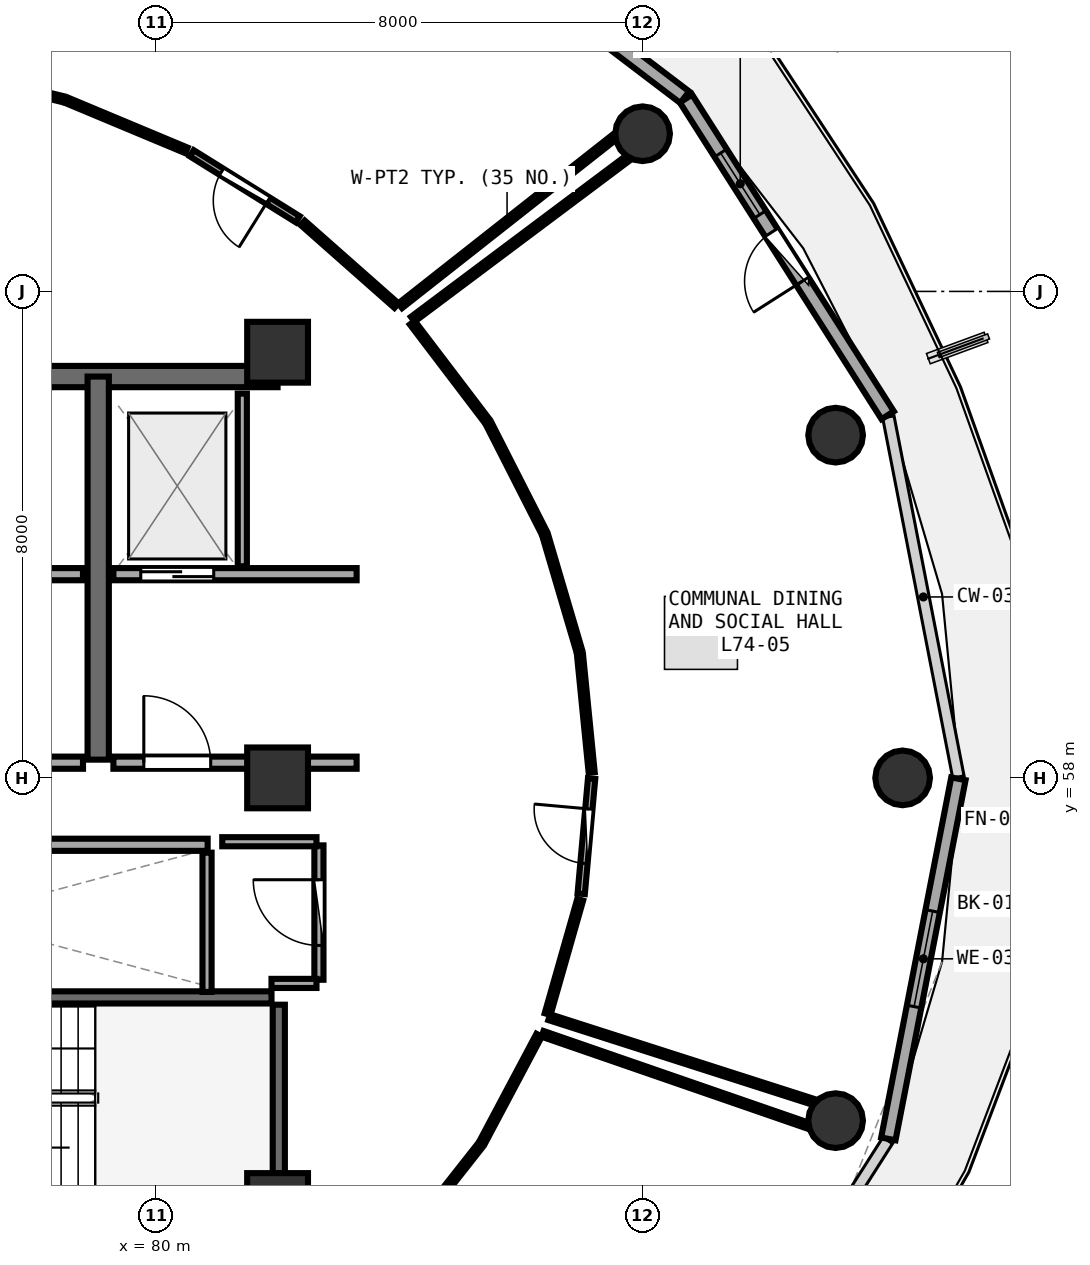
"""IFC4 building model, lengths in metres.
Left out: names, types, materials, properties, quantities, classifications, styles, units other than length and angle.
Written with IfcOpenShell. Run it as: python <this file> out.ifc"""

import sys

from ifc_helpers import new_model, si_unit, direction, frame, frame_2d, origin, origin_2d, place, context, subcontext, project, spatial, rectangle, circle, extrude, element, fill, save


model = new_model("IFC4")
c1 = context("Model", 3, precision=1e-05, world=origin(), true_north=direction((0.0, 1.0)))
c2 = subcontext(c1, "Body", "Model", "MODEL_VIEW")
j1 = project(units=[si_unit("LENGTHUNIT", "METRE"), si_unit("PLANEANGLEUNIT", "RADIAN")], contexts=[c1])
p1 = place(None, origin())
s1 = spatial("IfcSite", under=j1, at=p1, CompositionType="ELEMENT")
p2 = place(p1, origin())
s2 = spatial("IfcBuilding", under=s1, at=p2, CompositionType="ELEMENT")
p3 = place(p2, frame((0.0, 0.0, 289.95)))
s3 = spatial("IfcBuildingStorey", under=s2, at=p3, CompositionType="ELEMENT", Elevation=289.95)
for number, where, z_axis, x_axis in (
    (1, (82.0, 51.0, 0.0), (0.0, 0.0, 1.0), (1.0, 0.0, 0.0)),
    (2, (82.0, 58.0, 0.0), (0.0, 0.0, 1.0), (1.0, 0.0, 0.0)),
    (3, (82.0, 65.0, 0.0), (0.0, 0.0, 1.0), (1.0, 0.0, 0.0)),
):
    element("IfcColumn", number, at=place(p3, frame(where, z_axis=z_axis, x_axis=x_axis)), inside=s3, PredefinedType="PILASTER", context=c2, shape_type="SweptSolid", body=[
        extrude(rectangle(XDim=1.0, YDim=1.0, at=origin_2d()), origin(), (0.0, 0.0, 1.0), 3.75),
    ])
for number, where, z_axis, x_axis in (
    (4, (92.28, 58.0, 0.0), (0.0, 0.0, 1.0), (1.0, 0.0, 0.0)),
    (5, (91.177, 63.636, 0.0), (0.0, 0.0, 1.0), (1.0, 0.0, 0.0)),
    (6, (88.003, 68.593, 0.0), (0.0, 0.0, 1.0), (1.0, 0.0, 0.0)),
    (7, (91.177, 52.364, 0.0), (0.0, 0.0, 1.0), (1.0, 0.0, 0.0)),
):
    element("IfcColumn", number, at=place(p3, frame(where, z_axis=z_axis, x_axis=x_axis)), inside=s3, PredefinedType="COLUMN", context=c2, shape_type="SweptSolid", body=[
        extrude(circle(Radius=0.45, at=origin_2d()), origin(), (0.0, 0.0, 1.0), 3.75),
    ])
p4 = place(p3, frame((92.034, 63.964, 0.0), z_axis=(0.0, 0.0, 1.0), x_axis=(-0.537271968456, 0.843409053728, 0.0)))
e8 = element("IfcWall", 8, at=p4, inside=s3, PredefinedType="SOLIDWALL", context=c2, shape_type="SweptSolid", body=[
    extrude(rectangle(XDim=6.175, YDim=0.24, at=frame_2d((3.087, 0.0))), origin(), (0.0, 0.0, 1.0), 3.415),
])
p5 = place(p4, frame((2.613, 0.0, 0.0)))
e9 = element("IfcOpeningElement", 9, at=p5, cuts=e8, PredefinedType="OPENING", context=c2, shape_type="SweptSolid", body=[
    extrude(rectangle(XDim=0.95, YDim=2.1, at=frame_2d((0.475, 1.05))), frame((0.0, 0.13, 0.0), z_axis=(0.0, -1.0, 0.0), x_axis=(1.0, 0.0, 0.0)), (0.0, 0.0, 1.0), 0.26),
])
p6 = place(p4, frame((3.913, 0.0, 0.85)))
e10 = element("IfcOpeningElement", 10, at=p6, cuts=e8, PredefinedType="OPENING", context=c2, shape_type="SweptSolid", body=[
    extrude(rectangle(XDim=1.2, YDim=1.45, at=frame_2d((0.6, 0.725))), frame((0.0, 0.13, 0.0), z_axis=(0.0, -1.0, 0.0), x_axis=(1.0, 0.0, 0.0)), (0.0, 0.0, 1.0), 0.26),
])
p7 = place(p3, frame((88.696, 69.194, 0.0), z_axis=(0.0, 0.0, 1.0), x_axis=(-0.796010444211, 0.605282886514, 0.0)))
e11 = element("IfcWall", 11, at=p7, inside=s3, PredefinedType="SOLIDWALL", context=c2, shape_type="SweptSolid", body=[
    extrude(rectangle(XDim=6.387, YDim=0.24, at=frame_2d((3.194, 0.0))), origin(), (0.0, 0.0, 1.0), 3.415),
])
p8 = place(p7, frame((2.719, 0.0, 0.0)))
e12 = element("IfcOpeningElement", 12, at=p8, cuts=e11, PredefinedType="OPENING", context=c2, shape_type="SweptSolid", body=[
    extrude(rectangle(XDim=0.95, YDim=2.1, at=frame_2d((0.475, 1.05))), frame((0.0, 0.13, 0.0), z_axis=(0.0, -1.0, 0.0), x_axis=(1.0, 0.0, 0.0)), (0.0, 0.0, 1.0), 0.26),
])
p9 = place(p7, frame((4.019, 0.0, 0.85)))
e13 = element("IfcOpeningElement", 13, at=p9, cuts=e11, PredefinedType="OPENING", context=c2, shape_type="SweptSolid", body=[
    extrude(rectangle(XDim=1.2, YDim=1.45, at=frame_2d((0.6, 0.725))), frame((0.0, 0.13, 0.0), z_axis=(0.0, -1.0, 0.0), x_axis=(1.0, 0.0, 0.0)), (0.0, 0.0, 1.0), 0.26),
])
p10 = place(p3, frame((92.045, 52.063, 0.0), z_axis=(0.0, 0.0, 1.0), x_axis=(0.190969309115, 0.981596008028, 0.0)))
e14 = element("IfcWall", 14, at=p10, inside=s3, PredefinedType="SOLIDWALL", context=c2, shape_type="SweptSolid", body=[
    extrude(rectangle(XDim=6.033, YDim=0.24, at=frame_2d((3.017, 0.0))), origin(), (0.0, 0.0, 1.0), 3.415),
])
p11 = place(p10, frame((2.216, 0.0, 0.85)))
e15 = element("IfcOpeningElement", 15, at=p11, cuts=e14, PredefinedType="OPENING", context=c2, shape_type="SweptSolid", body=[
    extrude(rectangle(XDim=1.6, YDim=1.45, at=frame_2d((0.8, 0.725))), frame((0.0, 0.13, 0.0), z_axis=(0.0, -1.0, 0.0), x_axis=(1.0, 0.0, 0.0)), (0.0, 0.0, 1.0), 0.26),
])
p12 = place(p3, frame((82.02, 51.2, 0.0), z_axis=(0.0, 0.0, 1.0), x_axis=(0.0, 1.0, 0.0)))
e16 = element("IfcWall", 16, at=p12, inside=s3, PredefinedType="SHEAR", context=c2, shape_type="SweptSolid", body=[
    extrude(rectangle(XDim=3.07, YDim=0.2, at=frame_2d((1.535, 0.0))), origin(), (0.0, 0.0, 1.0), 3.43),
])
p13 = place(p3, frame((81.9, 54.39, 0.0), z_axis=(0.0, 0.0, 1.0), x_axis=(-1.0, 0.0, 0.0)))
e17 = element("IfcWall", 17, at=p13, inside=s3, PredefinedType="SHEAR", context=c2, shape_type="SweptSolid", body=[
    extrude(rectangle(XDim=8.46, YDim=0.2, at=frame_2d((4.23, 0.0))), origin(), (0.0, 0.0, 1.0), 3.43),
])
p14 = place(p3, frame((74.0, 64.6, 0.0), z_axis=(0.0, 0.0, 1.0), x_axis=(1.0, 0.0, 0.0)))
e18 = element("IfcWall", 18, at=p14, inside=s3, PredefinedType="SHEAR", context=c2, shape_type="SweptSolid", body=[
    extrude(rectangle(XDim=8.0, YDim=0.35, at=frame_2d((4.0, 0.0))), origin(), (0.0, 0.0, 1.0), 3.43),
])
p15 = place(p3, frame((79.05, 58.3, 0.0), z_axis=(0.0, 0.0, 1.0), x_axis=(0.0, 1.0, 0.0)))
e19 = element("IfcWall", 19, at=p15, inside=s3, PredefinedType="SHEAR", context=c2, shape_type="SweptSolid", body=[
    extrude(rectangle(XDim=6.3, YDim=0.35, at=frame_2d((3.15, 0.0))), origin(), (0.0, 0.0, 1.0), 3.43),
])
p16 = place(p3, frame((74.2, 61.35, 0.0), z_axis=(0.0, 0.0, 1.0), x_axis=(1.0, 0.0, 0.0)))
e20 = element("IfcWall", 20, at=p16, inside=s3, PredefinedType="SOLIDWALL", context=c2, shape_type="SweptSolid", body=[
    extrude(rectangle(XDim=4.6, YDim=0.2, at=frame_2d((2.3, 0.0))), origin(), (0.0, 0.0, 1.0), 3.42),
])
p17 = place(p16, frame((0.52, 0.0, 0.0)))
e21 = element("IfcOpeningElement", 21, at=p17, cuts=e20, PredefinedType="OPENING", context=c2, shape_type="SweptSolid", body=[
    extrude(rectangle(XDim=1.2, YDim=2.15, at=frame_2d((0.6, 1.075))), frame((0.0, 0.11, 0.0), z_axis=(0.0, -1.0, 0.0), x_axis=(1.0, 0.0, 0.0)), (0.0, 0.0, 1.0), 0.22),
])
p18 = place(p3, frame((79.3, 61.35, 0.0), z_axis=(0.0, 0.0, 1.0), x_axis=(1.0, 0.0, 0.0)))
e22 = element("IfcWall", 22, at=p18, inside=s3, PredefinedType="SOLIDWALL", context=c2, shape_type="SweptSolid", body=[
    extrude(rectangle(XDim=4.0, YDim=0.2, at=frame_2d((2.0, 0.0))), origin(), (0.0, 0.0, 1.0), 2.715),
])
p19 = place(p18, frame((0.45, 0.0, 0.0)))
e23 = element("IfcOpeningElement", 23, at=p19, cuts=e22, PredefinedType="OPENING", context=c2, shape_type="SweptSolid", body=[
    extrude(rectangle(XDim=1.2, YDim=2.15, at=frame_2d((0.6, 1.075))), frame((0.0, 0.11, 0.0), z_axis=(0.0, -1.0, 0.0), x_axis=(1.0, 0.0, 0.0)), (0.0, 0.0, 1.0), 0.22),
])
p20 = place(p3, frame((81.42, 61.48, 0.0), z_axis=(0.0, 0.0, 1.0), x_axis=(0.0, 1.0, 0.0)))
e24 = element("IfcWall", 24, at=p20, inside=s3, PredefinedType="PARTITIONING", context=c2, shape_type="SweptSolid", body=[
    extrude(rectangle(XDim=2.84, YDim=0.15, at=frame_2d((1.42, 0.0))), origin(), (0.0, 0.0, 1.0), 3.42),
])
p21 = place(p3, frame((74.2, 58.25, 0.0), z_axis=(0.0, 0.0, 1.0), x_axis=(1.0, 0.0, 0.0)))
e25 = element("IfcWall", 25, at=p21, inside=s3, PredefinedType="SOLIDWALL", context=c2, shape_type="SweptSolid", body=[
    extrude(rectangle(XDim=4.6, YDim=0.2, at=frame_2d((2.3, 0.0))), origin(), (0.0, 0.0, 1.0), 3.42),
])
p22 = place(p21, frame((1.8, 0.0, 0.0)))
e26 = element("IfcOpeningElement", 26, at=p22, cuts=e25, PredefinedType="OPENING", context=c2, shape_type="SweptSolid", body=[
    extrude(rectangle(XDim=1.1, YDim=2.1, at=frame_2d((0.55, 1.05))), frame((0.0, 0.11, 0.0), z_axis=(0.0, -1.0, 0.0), x_axis=(1.0, 0.0, 0.0)), (0.0, 0.0, 1.0), 0.22),
])
p23 = place(p3, frame((79.3, 58.25, 0.0), z_axis=(0.0, 0.0, 1.0), x_axis=(1.0, 0.0, 0.0)))
e27 = element("IfcWall", 27, at=p23, inside=s3, PredefinedType="SOLIDWALL", context=c2, shape_type="SweptSolid", body=[
    extrude(rectangle(XDim=4.0, YDim=0.2, at=frame_2d((2.0, 0.0))), origin(), (0.0, 0.0, 1.0), 2.715),
])
p24 = place(p23, frame((0.5, 0.0, 0.0)))
e28 = element("IfcOpeningElement", 28, at=p24, cuts=e27, PredefinedType="OPENING", context=c2, shape_type="SweptSolid", body=[
    extrude(rectangle(XDim=1.1, YDim=2.1, at=frame_2d((0.55, 1.05))), frame((0.0, 0.11, 0.0), z_axis=(0.0, -1.0, 0.0), x_axis=(1.0, 0.0, 0.0)), (0.0, 0.0, 1.0), 0.22),
])
p25 = place(p3, frame((72.45, 56.9, 0.0), z_axis=(0.0, 0.0, 1.0), x_axis=(1.0, 0.0, 0.0)))
e29 = element("IfcWall", 29, at=p25, inside=s3, PredefinedType="SOLIDWALL", context=c2, shape_type="SweptSolid", body=[
    extrude(rectangle(XDim=8.4, YDim=0.2, at=frame_2d((4.2, 0.0))), origin(), (0.0, 0.0, 1.0), 3.42),
])
p26 = place(p25, frame((0.4, 0.0, 0.0)))
e30 = element("IfcOpeningElement", 30, at=p26, cuts=e29, PredefinedType="OPENING", context=c2, shape_type="SweptSolid", body=[
    extrude(rectangle(XDim=1.1, YDim=2.1, at=frame_2d((0.55, 1.05))), frame((0.0, 0.11, 0.0), z_axis=(0.0, -1.0, 0.0), x_axis=(1.0, 0.0, 0.0)), (0.0, 0.0, 1.0), 0.22),
])
p27 = place(p25, frame((2.4, 0.0, 0.0)))
e31 = element("IfcOpeningElement", 31, at=p27, cuts=e29, PredefinedType="OPENING", context=c2, shape_type="SweptSolid", body=[
    extrude(rectangle(XDim=1.1, YDim=2.1, at=frame_2d((0.55, 1.05))), frame((0.0, 0.11, 0.0), z_axis=(0.0, -1.0, 0.0), x_axis=(1.0, 0.0, 0.0)), (0.0, 0.0, 1.0), 0.22),
])
p28 = place(p3, frame((80.84, 54.48, 0.0), z_axis=(0.0, 0.0, 1.0), x_axis=(0.0, 1.0, 0.0)))
e32 = element("IfcWall", 32, at=p28, inside=s3, PredefinedType="PARTITIONING", context=c2, shape_type="SweptSolid", body=[
    extrude(rectangle(XDim=2.29, YDim=0.15, at=frame_2d((1.145, 0.0))), origin(), (0.0, 0.0, 1.0), 3.42),
])
p29 = place(p3, frame((82.68, 54.68, 0.0), z_axis=(0.0, 0.0, 1.0), x_axis=(0.0, 1.0, 0.0)))
e33 = element("IfcWall", 33, at=p29, inside=s3, PredefinedType="PARTITIONING", context=c2, shape_type="SweptSolid", body=[
    extrude(rectangle(XDim=2.21, YDim=0.15, at=frame_2d((1.105, 0.0))), origin(), (0.0, 0.0, 1.0), 3.42),
])
p30 = place(p29, frame((0.565, 0.0, 0.0)))
e34 = element("IfcOpeningElement", 34, at=p30, cuts=e33, PredefinedType="OPENING", context=c2, shape_type="SweptSolid", body=[
    extrude(rectangle(XDim=1.08, YDim=2.1, at=frame_2d((0.54, 1.05))), frame((0.0, 0.085, 0.0), z_axis=(0.0, -1.0, 0.0), x_axis=(1.0, 0.0, 0.0)), (0.0, 0.0, 1.0), 0.17),
])
p31 = place(p3, frame((86.993, 56.094, 0.0), z_axis=(0.0, 0.0, 1.0), x_axis=(0.089968706127, 0.995944592795, 0.0)))
e35 = element("IfcWall", 35, at=p31, inside=s3, PredefinedType="PARTITIONING", context=c2, shape_type="SweptSolid", body=[
    extrude(rectangle(XDim=1.902, YDim=0.12, at=frame_2d((0.951, 0.0))), origin(), (0.0, 0.0, 1.0), 3.015),
])
p32 = place(p31, frame((0.501, 0.0, 0.0)))
e36 = element("IfcOpeningElement", 36, at=p32, cuts=e35, PredefinedType="OPENING", context=c2, shape_type="SweptSolid", body=[
    extrude(rectangle(XDim=0.9, YDim=2.08, at=frame_2d((0.45, 1.04))), frame((0.0, 0.07, 0.0), z_axis=(0.0, -1.0, 0.0), x_axis=(1.0, 0.0, 0.0)), (0.0, 0.0, 1.0), 0.14),
])
p33 = place(p3, frame((82.332, 67.187, 0.0), z_axis=(0.0, 0.0, 1.0), x_axis=(-0.848878791214, 0.528587549823, 0.0)))
e37 = element("IfcWall", 37, at=p33, inside=s3, PredefinedType="PARTITIONING", context=c2, shape_type="SweptSolid", body=[
    extrude(rectangle(XDim=2.053, YDim=0.12, at=frame_2d((1.027, 0.0))), origin(), (0.0, 0.0, 1.0), 3.015),
])
p34 = place(p33, frame((0.577, 0.0, 0.0)))
e38 = element("IfcOpeningElement", 38, at=p34, cuts=e37, PredefinedType="OPENING", context=c2, shape_type="SweptSolid", body=[
    extrude(rectangle(XDim=0.9, YDim=2.08, at=frame_2d((0.45, 1.04))), frame((0.0, 0.07, 0.0), z_axis=(0.0, -1.0, 0.0), x_axis=(1.0, 0.0, 0.0)), (0.0, 0.0, 1.0), 0.14),
])
p35 = place(p3, frame((81.9, 54.62, 0.0), z_axis=(0.0, 0.0, 1.0), x_axis=(1.0, 0.0, 0.0)))
e39 = element("IfcWall", 39, at=p35, inside=s3, PredefinedType="PARTITIONING", context=c2, shape_type="SweptSolid", body=[
    extrude(rectangle(XDim=0.74, YDim=0.15, at=frame_2d((0.37, 0.0))), origin(), (0.0, 0.0, 1.0), 2.715),
])
p36 = place(p3, frame((82.64, 56.95, 0.0), z_axis=(0.0, 0.0, 1.0), x_axis=(-1.0, 0.0, 0.0)))
e40 = element("IfcWall", 40, at=p36, inside=s3, PredefinedType="PARTITIONING", context=c2, shape_type="SweptSolid", body=[
    extrude(rectangle(XDim=1.55, YDim=0.15, at=frame_2d((0.775, 0.0))), origin(), (0.0, 0.0, 1.0), 2.715),
])
p37 = place(p3, frame((84.079, 50.365, 0.0), z_axis=(0.0, 0.0, 1.0), x_axis=(0.618820199788, 0.785532660259, 0.0)))
e41 = element("IfcWall", 41, at=p37, inside=s3, PredefinedType="PARTITIONING", context=c2, shape_type="SweptSolid", body=[
    extrude(rectangle(XDim=2.018, YDim=0.1, at=frame_2d((1.009, 0.0))), origin(), (0.0, 0.0, 1.0), 3.015),
])
p38 = place(p3, frame((85.371, 52.016, 0.0), z_axis=(0.0, 0.0, 1.0), x_axis=(0.468933294906, 0.883233584579, 0.0)))
e42 = element("IfcWall", 42, at=p38, inside=s3, PredefinedType="PARTITIONING", context=c2, shape_type="SweptSolid", body=[
    extrude(rectangle(XDim=1.984, YDim=0.1, at=frame_2d((0.992, 0.0))), origin(), (0.0, 0.0, 1.0), 3.175),
])
p39 = place(p3, frame((86.358, 53.791, 0.0), z_axis=(0.0, 0.0, 1.0), x_axis=(0.945103281494, -0.326771766388, 0.0)))
e43 = element("IfcWall", 43, at=p39, inside=s3, PredefinedType="PARTITIONING", context=c2, shape_type="SweptSolid", body=[
    extrude(rectangle(XDim=4.604, YDim=0.1, at=frame_2d((2.302, 0.0))), origin(), (0.0, 0.0, 1.0), 3.015),
])
p40 = place(p3, frame((86.441, 54.115, 0.0), z_axis=(0.0, 0.0, 1.0), x_axis=(0.274226302341, 0.961665188673, 0.0)))
e44 = element("IfcWall", 44, at=p40, inside=s3, PredefinedType="PARTITIONING", context=c2, shape_type="SweptSolid", body=[
    extrude(rectangle(XDim=1.955, YDim=0.1, at=frame_2d((0.978, 0.0))), origin(), (0.0, 0.0, 1.0), 3.42),
])
p41 = place(p3, frame((87.166, 58.088, 0.0), z_axis=(0.0, 0.0, 1.0), x_axis=(-0.098769631998, 0.995110325439, 0.0)))
e45 = element("IfcWall", 45, at=p41, inside=s3, PredefinedType="PARTITIONING", context=c2, shape_type="SweptSolid", body=[
    extrude(rectangle(XDim=1.943, YDim=0.1, at=frame_2d((0.971, 0.0))), origin(), (0.0, 0.0, 1.0), 3.015),
])
p42 = place(p3, frame((86.959, 60.099, 0.0), z_axis=(0.0, 0.0, 1.0), x_axis=(-0.28293653612, 0.959138632591, 0.0)))
e46 = element("IfcWall", 46, at=p42, inside=s3, PredefinedType="PARTITIONING", context=c2, shape_type="SweptSolid", body=[
    extrude(rectangle(XDim=1.956, YDim=0.1, at=frame_2d((0.978, 0.0))), origin(), (0.0, 0.0, 1.0), 3.42),
])
p43 = place(p3, frame((86.376, 62.05, 0.0), z_axis=(0.0, 0.0, 1.0), x_axis=(-0.453658133306, 0.891175795276, 0.0)))
e47 = element("IfcWall", 47, at=p43, inside=s3, PredefinedType="PARTITIONING", context=c2, shape_type="SweptSolid", body=[
    extrude(rectangle(XDim=1.981, YDim=0.1, at=frame_2d((0.991, 0.0))), origin(), (0.0, 0.0, 1.0), 3.175),
])
p44 = place(p3, frame((85.435, 63.883, 0.0), z_axis=(0.0, 0.0, 1.0), x_axis=(-0.605473441765, 0.795865510823, 0.0)))
e48 = element("IfcWall", 48, at=p44, inside=s3, PredefinedType="PARTITIONING", context=c2, shape_type="SweptSolid", body=[
    extrude(rectangle(XDim=2.014, YDim=0.1, at=frame_2d((1.007, 0.0))), origin(), (0.0, 0.0, 1.0), 3.015),
])
p45 = place(p3, frame((84.223, 65.542, 0.0), z_axis=(0.0, 0.0, 1.0), x_axis=(0.800384816546, 0.599486568191, 0.0)))
e49 = element("IfcWall", 49, at=p45, inside=s3, PredefinedType="PARTITIONING", context=c2, shape_type="SweptSolid", body=[
    extrude(rectangle(XDim=4.414, YDim=0.1, at=frame_2d((2.207, 0.0))), origin(), (0.0, 0.0, 1.0), 3.115),
])
p46 = place(p3, frame((90.816, 52.671, 0.0), z_axis=(0.0, 0.0, 1.0), x_axis=(-0.95227750557, 0.305233602976, 0.0)))
e50 = element("IfcWall", 50, at=p46, inside=s3, PredefinedType="PARTITIONING", context=c2, shape_type="SweptSolid", body=[
    extrude(rectangle(XDim=4.565, YDim=0.1, at=frame_2d((2.283, 0.0))), origin(), (0.0, 0.0, 1.0), 3.115),
])
p47 = place(p3, frame((83.955, 65.767, 0.0), z_axis=(0.0, 0.0, 1.0), x_axis=(-0.749539941976, 0.661959119117, 0.0)))
e51 = element("IfcWall", 51, at=p47, inside=s3, PredefinedType="PARTITIONING", context=c2, shape_type="SweptSolid", body=[
    extrude(rectangle(XDim=2.057, YDim=0.1, at=frame_2d((1.029, 0.0))), origin(), (0.0, 0.0, 1.0), 3.015),
])
p48 = place(p3, frame((80.501, 68.319, 0.0), z_axis=(0.0, 0.0, 1.0), x_axis=(-0.922644563927, 0.385651408213, 0.0)))
e52 = element("IfcWall", 52, at=p48, inside=s3, PredefinedType="PARTITIONING", context=c2, shape_type="SweptSolid", body=[
    extrude(rectangle(XDim=2.125, YDim=0.1, at=frame_2d((1.062, 0.0))), origin(), (0.0, 0.0, 1.0), 3.42),
])
p49 = place(p3, frame((78.465, 69.164, 0.0), z_axis=(0.0, 0.0, 1.0), x_axis=(-0.971628772742, 0.236511158257, 0.0)))
e53 = element("IfcWall", 53, at=p49, inside=s3, PredefinedType="PARTITIONING", context=c2, shape_type="SweptSolid", body=[
    extrude(rectangle(XDim=2.147, YDim=0.1, at=frame_2d((1.074, 0.0))), origin(), (0.0, 0.0, 1.0), 3.42),
])
p50 = place(p3, frame((87.532, 68.532, 0.0), z_axis=(0.0, 0.0, 1.0), x_axis=(-0.785736749878, -0.618561039745, 0.0)))
e54 = element("IfcWall", 54, at=p50, inside=s3, PredefinedType="PARTITIONING", context=c2, shape_type="SweptSolid", body=[
    extrude(rectangle(XDim=4.475, YDim=0.1, at=frame_2d((2.237, 0.0))), origin(), (0.0, 0.0, 1.0), 3.015),
])
p51 = place(p5, frame((0.95, 0.0, 0.0), z_axis=(0.0, 0.0, 1.0), x_axis=(-1.0, 0.0, 0.0)))
e55 = element("IfcDoor", 55, at=p51, inside=s3, OperationType="SINGLE_SWING_RIGHT", PredefinedType="DOOR", context=c2, shape_type="SweptSolid", body=[
    extrude(rectangle(XDim=0.95, YDim=2.1, at=frame_2d((0.475, 1.05))), frame((0.0, 0.025, 0.0), z_axis=(0.0, -1.0, 0.0), x_axis=(1.0, 0.0, 0.0)), (0.0, 0.0, 1.0), 0.05),
])
fill(e9, e55)
p52 = place(p6, origin())
e56 = element("IfcWindow", 56, at=p52, inside=s3, PartitioningType="SINGLE_PANEL", PredefinedType="WINDOW", context=c2, shape_type="SweptSolid", body=[
    extrude(rectangle(XDim=1.2, YDim=1.45, at=frame_2d((0.6, 0.725))), frame((0.0, 0.03, 0.0), z_axis=(0.0, -1.0, 0.0), x_axis=(1.0, 0.0, 0.0)), (0.0, 0.0, 1.0), 0.06),
])
fill(e10, e56)
p53 = place(p11, origin())
e57 = element("IfcWindow", 57, at=p53, inside=s3, PartitioningType="SINGLE_PANEL", PredefinedType="WINDOW", context=c2, shape_type="SweptSolid", body=[
    extrude(rectangle(XDim=1.6, YDim=1.45, at=frame_2d((0.8, 0.725))), frame((0.0, 0.03, 0.0), z_axis=(0.0, -1.0, 0.0), x_axis=(1.0, 0.0, 0.0)), (0.0, 0.0, 1.0), 0.06),
])
fill(e15, e57)
p54 = place(p19, origin())
e58 = element("IfcDoor", 58, at=p54, inside=s3, OperationType="DOUBLE_DOOR_SLIDING", PredefinedType="DOOR", context=c2, shape_type="SweptSolid", body=[
    extrude(rectangle(XDim=1.2, YDim=2.15, at=frame_2d((0.6, 1.075))), frame((0.0, 0.025, 0.0), z_axis=(0.0, -1.0, 0.0), x_axis=(1.0, 0.0, 0.0)), (0.0, 0.0, 1.0), 0.05),
])
fill(e23, e58)
p55 = place(p24, frame((1.1, 0.0, 0.0), z_axis=(0.0, 0.0, 1.0), x_axis=(-1.0, 0.0, 0.0)))
e59 = element("IfcDoor", 59, at=p55, inside=s3, OperationType="SINGLE_SWING_RIGHT", PredefinedType="DOOR", context=c2, shape_type="SweptSolid", body=[
    extrude(rectangle(XDim=1.1, YDim=2.1, at=frame_2d((0.55, 1.05))), frame((0.0, 0.025, 0.0), z_axis=(0.0, -1.0, 0.0), x_axis=(1.0, 0.0, 0.0)), (0.0, 0.0, 1.0), 0.05),
])
fill(e28, e59)
p56 = place(p30, origin())
e60 = element("IfcDoor", 60, at=p56, inside=s3, OperationType="SINGLE_SWING_RIGHT", PredefinedType="DOOR", context=c2, shape_type="SweptSolid", body=[
    extrude(rectangle(XDim=1.08, YDim=2.1, at=frame_2d((0.54, 1.05))), frame((0.0, 0.025, 0.0), z_axis=(0.0, -1.0, 0.0), x_axis=(1.0, 0.0, 0.0)), (0.0, 0.0, 1.0), 0.05),
])
fill(e34, e60)
p57 = place(p32, origin())
e61 = element("IfcDoor", 61, at=p57, inside=s3, OperationType="SINGLE_SWING_RIGHT", PredefinedType="DOOR", context=c2, shape_type="SweptSolid", body=[
    extrude(rectangle(XDim=0.9, YDim=2.08, at=frame_2d((0.45, 1.04))), frame((0.0, 0.025, 0.0), z_axis=(0.0, -1.0, 0.0), x_axis=(1.0, 0.0, 0.0)), (0.0, 0.0, 1.0), 0.05),
])
fill(e36, e61)
p58 = place(p34, origin())
e62 = element("IfcDoor", 62, at=p58, inside=s3, OperationType="SINGLE_SWING_LEFT", PredefinedType="DOOR", context=c2, shape_type="SweptSolid", body=[
    extrude(rectangle(XDim=0.9, YDim=2.08, at=frame_2d((0.45, 1.04))), frame((0.0, 0.025, 0.0), z_axis=(0.0, -1.0, 0.0), x_axis=(1.0, 0.0, 0.0)), (0.0, 0.0, 1.0), 0.05),
])
fill(e38, e62)
save(model, sys.argv[1])
